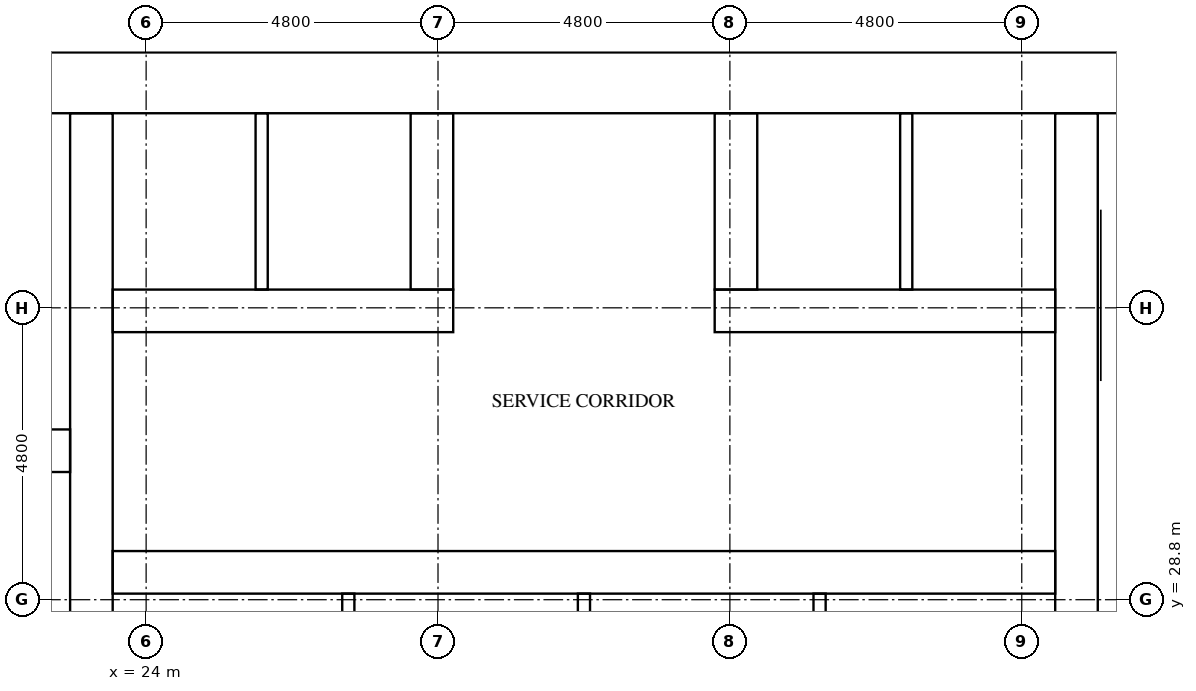
"""IFC4 building model, lengths in metres.
Left out: names, types, materials, properties, quantities, classifications, styles, units other than length and angle.
Written with IfcOpenShell. Run it as: python <this file> out.ifc"""

import sys

from ifc_helpers import new_model, si_unit, direction, frame, frame_2d, origin, place, context, subcontext, project, spatial, rectangle, extrude, element, fill, save


model = new_model("IFC4")
c1 = context("Model", 3, precision=1e-05, world=origin(), true_north=direction((0.0, 1.0)))
c2 = subcontext(c1, "Body", "Model", "MODEL_VIEW")
j1 = project(units=[si_unit("LENGTHUNIT", "METRE"), si_unit("PLANEANGLEUNIT", "RADIAN")], contexts=[c1])
p1 = place(None, origin())
s1 = spatial("IfcSite", under=j1, at=p1, CompositionType="ELEMENT")
p2 = place(p1, origin())
s2 = spatial("IfcBuilding", under=s1, at=p2, CompositionType="ELEMENT")
p3 = place(p2, frame((0.0, 0.0, 46.9)))
s3 = spatial("IfcBuildingStorey", under=s2, at=p3, CompositionType="ELEMENT", Elevation=46.9)
p4 = place(p3, frame((15.0, 37.3, 0.0), z_axis=(0.0, 0.0, 1.0), x_axis=(1.0, 0.0, 0.0)))
e1 = element("IfcWall", 1, at=p4, inside=s3, PredefinedType="SHEAR", context=c2, shape_type="SweptSolid", body=[
    extrude(rectangle(XDim=32.4, YDim=1.0, at=frame_2d((16.2, 0.0))), origin(), (0.0, 0.0, 1.0), 3.2),
])
p5 = place(p4, frame((15.3, 0.0, 0.0)))
e2 = element("IfcOpeningElement", 2, at=p5, cuts=e1, PredefinedType="OPENING", context=c2, shape_type="SweptSolid", body=[
    extrude(rectangle(XDim=1.8, YDim=2.1, at=frame_2d((0.9, 1.05))), frame((0.0, 0.51, 0.0), z_axis=(0.0, -1.0, 0.0), x_axis=(1.0, 0.0, 0.0)), (0.0, 0.0, 1.0), 1.02),
])
p6 = place(p4, frame((1.766, 0.0, 0.0)))
e3 = element("IfcOpeningElement", 3, at=p6, cuts=e1, PredefinedType="OPENING", context=c2, shape_type="SweptSolid", body=[
    extrude(rectangle(XDim=1.0, YDim=2.1, at=frame_2d((0.5, 1.05))), frame((0.0, 0.51, 0.0), z_axis=(0.0, -1.0, 0.0), x_axis=(1.0, 0.0, 0.0)), (0.0, 0.0, 1.0), 1.02),
])
p7 = place(p4, frame((5.241, 0.0, 0.0)))
e4 = element("IfcOpeningElement", 4, at=p7, cuts=e1, PredefinedType="OPENING", context=c2, shape_type="SweptSolid", body=[
    extrude(rectangle(XDim=1.0, YDim=2.1, at=frame_2d((0.5, 1.05))), frame((0.0, 0.51, 0.0), z_axis=(0.0, -1.0, 0.0), x_axis=(1.0, 0.0, 0.0)), (0.0, 0.0, 1.0), 1.02),
])
p8 = place(p3, frame((23.1, 16.0, 0.0), z_axis=(0.0, 0.0, 1.0), x_axis=(0.0, 1.0, 0.0)))
e5 = element("IfcWall", 5, at=p8, inside=s3, PredefinedType="SHEAR", context=c2, shape_type="SweptSolid", body=[
    extrude(rectangle(XDim=20.8, YDim=0.7, at=frame_2d((10.4, 0.0))), origin(), (0.0, 0.0, 1.0), 3.2),
])
p9 = place(p3, frame((39.3, 27.75, 0.0), z_axis=(0.0, 0.0, 1.0), x_axis=(0.0, 1.0, 0.0)))
e6 = element("IfcWall", 6, at=p9, inside=s3, PredefinedType="SHEAR", context=c2, shape_type="SweptSolid", body=[
    extrude(rectangle(XDim=9.05, YDim=0.7, at=frame_2d((4.525, 0.0))), origin(), (0.0, 0.0, 1.0), 3.2),
])
p10 = place(p3, frame((16.0, 31.25, 0.0), z_axis=(0.0, 0.0, 1.0), x_axis=(1.0, 0.0, 0.0)))
e7 = element("IfcWall", 7, at=p10, inside=s3, PredefinedType="SHEAR", context=c2, shape_type="SweptSolid", body=[
    extrude(rectangle(XDim=6.75, YDim=0.7, at=frame_2d((3.375, 0.0))), origin(), (0.0, 0.0, 1.0), 3.2),
])
p11 = place(p3, frame((23.45, 29.25, 0.0), z_axis=(0.0, 0.0, 1.0), x_axis=(1.0, 0.0, 0.0)))
e8 = element("IfcWall", 8, at=p11, inside=s3, PredefinedType="SHEAR", context=c2, shape_type="SweptSolid", body=[
    extrude(rectangle(XDim=15.5, YDim=0.7, at=frame_2d((7.75, 0.0))), origin(), (0.0, 0.0, 1.0), 3.2),
])
p12 = place(p11, frame((1.387, 0.0, 0.0)))
e9 = element("IfcOpeningElement", 9, at=p12, cuts=e8, PredefinedType="OPENING", context=c2, shape_type="SweptSolid", body=[
    extrude(rectangle(XDim=1.0, YDim=2.1, at=frame_2d((0.5, 1.05))), frame((0.0, 0.36, 0.0), z_axis=(0.0, -1.0, 0.0), x_axis=(1.0, 0.0, 0.0)), (0.0, 0.0, 1.0), 0.72),
])
p13 = place(p11, frame((5.312, 0.0, 0.0)))
e10 = element("IfcOpeningElement", 10, at=p13, cuts=e8, PredefinedType="OPENING", context=c2, shape_type="SweptSolid", body=[
    extrude(rectangle(XDim=1.0, YDim=2.1, at=frame_2d((0.5, 1.05))), frame((0.0, 0.36, 0.0), z_axis=(0.0, -1.0, 0.0), x_axis=(1.0, 0.0, 0.0)), (0.0, 0.0, 1.0), 0.72),
])
p14 = place(p11, frame((9.188, 0.0, 0.0)))
e11 = element("IfcOpeningElement", 11, at=p14, cuts=e8, PredefinedType="OPENING", context=c2, shape_type="SweptSolid", body=[
    extrude(rectangle(XDim=1.0, YDim=2.1, at=frame_2d((0.5, 1.05))), frame((0.0, 0.36, 0.0), z_axis=(0.0, -1.0, 0.0), x_axis=(1.0, 0.0, 0.0)), (0.0, 0.0, 1.0), 0.72),
])
p15 = place(p11, frame((13.113, 0.0, 0.0)))
e12 = element("IfcOpeningElement", 12, at=p15, cuts=e8, PredefinedType="OPENING", context=c2, shape_type="SweptSolid", body=[
    extrude(rectangle(XDim=1.0, YDim=2.1, at=frame_2d((0.5, 1.05))), frame((0.0, 0.36, 0.0), z_axis=(0.0, -1.0, 0.0), x_axis=(1.0, 0.0, 0.0)), (0.0, 0.0, 1.0), 0.72),
])
p16 = place(p3, frame((23.45, 33.55, 0.0), z_axis=(0.0, 0.0, 1.0), x_axis=(1.0, 0.0, 0.0)))
e13 = element("IfcWall", 13, at=p16, inside=s3, PredefinedType="SHEAR", context=c2, shape_type="SweptSolid", body=[
    extrude(rectangle(XDim=5.6, YDim=0.7, at=frame_2d((2.8, 0.0))), origin(), (0.0, 0.0, 1.0), 3.2),
])
p17 = place(p3, frame((33.35, 33.55, 0.0), z_axis=(0.0, 0.0, 1.0), x_axis=(1.0, 0.0, 0.0)))
e14 = element("IfcWall", 14, at=p17, inside=s3, PredefinedType="SHEAR", context=c2, shape_type="SweptSolid", body=[
    extrude(rectangle(XDim=5.6, YDim=0.7, at=frame_2d((2.8, 0.0))), origin(), (0.0, 0.0, 1.0), 3.2),
])
for number, where, z_axis, x_axis in (
    (15, (28.7, 33.9, 0.0), (0.0, 0.0, 1.0), (0.0, 1.0, 0.0)),
    (16, (33.7, 33.9, 0.0), (0.0, 0.0, 1.0), (0.0, 1.0, 0.0)),
):
    element("IfcWall", number, at=place(p3, frame(where, z_axis=z_axis, x_axis=x_axis)), inside=s3, PredefinedType="SHEAR", context=c2, shape_type="SweptSolid", body=[
        extrude(rectangle(XDim=2.9, YDim=0.7, at=frame_2d((1.45, 0.0))), origin(), (0.0, 0.0, 1.0), 3.2),
    ])
for number, where, z_axis, x_axis in (
    (17, (25.9, 33.9, 0.0), (0.0, 0.0, 1.0), (0.0, 1.0, 0.0)),
    (18, (36.5, 33.9, 0.0), (0.0, 0.0, 1.0), (0.0, 1.0, 0.0)),
):
    element("IfcWall", number, at=place(p3, frame(where, z_axis=z_axis, x_axis=x_axis)), inside=s3, PredefinedType="SOLIDWALL", context=c2, shape_type="SweptSolid", body=[
        extrude(rectangle(XDim=2.9, YDim=0.2, at=frame_2d((1.45, 0.0))), origin(), (0.0, 0.0, 1.0), 3.2),
    ])
for number, where, z_axis, x_axis in (
    (19, (27.325, 26.5, 0.0), (0.0, 0.0, 1.0), (0.0, 1.0, 0.0)),
    (20, (31.2, 26.5, 0.0), (0.0, 0.0, 1.0), (0.0, 1.0, 0.0)),
    (21, (35.075, 26.5, 0.0), (0.0, 0.0, 1.0), (0.0, 1.0, 0.0)),
):
    element("IfcWall", number, at=place(p3, frame(where, z_axis=z_axis, x_axis=x_axis)), inside=s3, PredefinedType="PARTITIONING", context=c2, shape_type="SweptSolid", body=[
        extrude(rectangle(XDim=2.4, YDim=0.2, at=frame_2d((1.2, 0.0))), origin(), (0.0, 0.0, 1.0), 3.2),
    ])
p18 = place(p5, origin())
e22 = element("IfcDoor", 22, at=p18, inside=s3, OperationType="DOUBLE_DOOR_SINGLE_SWING", PredefinedType="DOOR", context=c2, shape_type="SweptSolid", body=[
    extrude(rectangle(XDim=1.8, YDim=2.1, at=frame_2d((0.9, 1.05))), frame((0.0, 0.025, 0.0), z_axis=(0.0, -1.0, 0.0), x_axis=(1.0, 0.0, 0.0)), (0.0, 0.0, 1.0), 0.05),
])
fill(e2, e22)
p19 = place(p12, origin())
e23 = element("IfcDoor", 23, at=p19, inside=s3, OperationType="SINGLE_SWING_RIGHT", PredefinedType="DOOR", context=c2, shape_type="SweptSolid", body=[
    extrude(rectangle(XDim=1.0, YDim=2.1, at=frame_2d((0.5, 1.05))), frame((0.0, 0.025, 0.0), z_axis=(0.0, -1.0, 0.0), x_axis=(1.0, 0.0, 0.0)), (0.0, 0.0, 1.0), 0.05),
])
fill(e9, e23)
p20 = place(p13, origin())
e24 = element("IfcDoor", 24, at=p20, inside=s3, OperationType="SINGLE_SWING_LEFT", PredefinedType="DOOR", context=c2, shape_type="SweptSolid", body=[
    extrude(rectangle(XDim=1.0, YDim=2.1, at=frame_2d((0.5, 1.05))), frame((0.0, 0.025, 0.0), z_axis=(0.0, -1.0, 0.0), x_axis=(1.0, 0.0, 0.0)), (0.0, 0.0, 1.0), 0.05),
])
fill(e10, e24)
p21 = place(p14, origin())
e25 = element("IfcDoor", 25, at=p21, inside=s3, OperationType="SINGLE_SWING_RIGHT", PredefinedType="DOOR", context=c2, shape_type="SweptSolid", body=[
    extrude(rectangle(XDim=1.0, YDim=2.1, at=frame_2d((0.5, 1.05))), frame((0.0, 0.025, 0.0), z_axis=(0.0, -1.0, 0.0), x_axis=(1.0, 0.0, 0.0)), (0.0, 0.0, 1.0), 0.05),
])
fill(e11, e25)
p22 = place(p15, origin())
e26 = element("IfcDoor", 26, at=p22, inside=s3, OperationType="SINGLE_SWING_LEFT", PredefinedType="DOOR", context=c2, shape_type="SweptSolid", body=[
    extrude(rectangle(XDim=1.0, YDim=2.1, at=frame_2d((0.5, 1.05))), frame((0.0, 0.025, 0.0), z_axis=(0.0, -1.0, 0.0), x_axis=(1.0, 0.0, 0.0)), (0.0, 0.0, 1.0), 0.05),
])
fill(e12, e26)
save(model, sys.argv[1])
